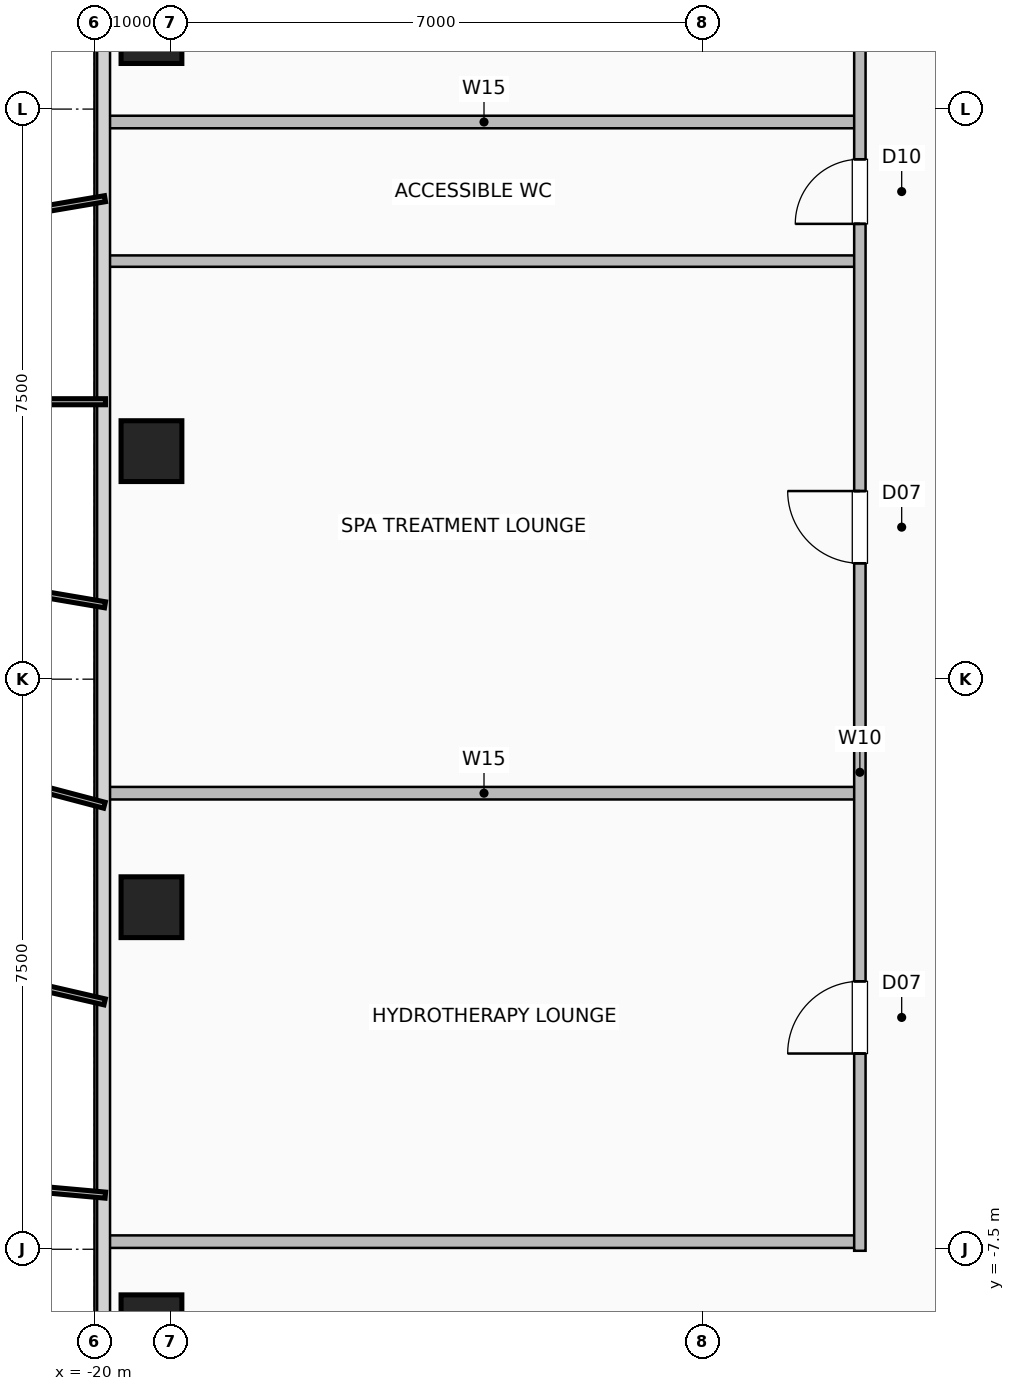
"""IFC4 building model, lengths in metres.
Left out: names, types, materials, properties, quantities, classifications, styles, units other than length and angle.
Written with IfcOpenShell. Run it as: python <this file> out.ifc"""

import sys

from ifc_helpers import new_model, si_unit, direction, frame, frame_2d, origin, origin_2d, place, context, subcontext, project, spatial, rectangle, hollow_rectangle, extrude, element, fill, save


model = new_model("IFC4")
c1 = context("Model", 3, precision=1e-05, world=origin(), true_north=direction((0.0, 1.0)))
c2 = subcontext(c1, "Body", "Model", "MODEL_VIEW")
j1 = project(units=[si_unit("LENGTHUNIT", "METRE"), si_unit("PLANEANGLEUNIT", "RADIAN")], contexts=[c1])
p1 = place(None, origin())
s1 = spatial("IfcSite", under=j1, at=p1, CompositionType="ELEMENT")
p2 = place(p1, origin())
s2 = spatial("IfcBuilding", under=s1, at=p2, CompositionType="ELEMENT")
p3 = place(p2, frame((0.0, 0.0, 205.8)))
s3 = spatial("IfcBuildingStorey", under=s2, at=p3, CompositionType="ELEMENT", Elevation=205.8)
for number, where, z_axis, x_axis in (
    (1, (-19.25, -8.5, 0.0), (0.0, 0.0, 1.0), (1.0, 0.0, 0.0)),
    (2, (-19.25, -3.0, 0.0), (0.0, 0.0, 1.0), (1.0, 0.0, 0.0)),
    (3, (-19.25, 3.0, 0.0), (0.0, 0.0, 1.0), (1.0, 0.0, 0.0)),
    (4, (-19.25, 8.5, 0.0), (0.0, 0.0, 1.0), (1.0, 0.0, 0.0)),
):
    element("IfcColumn", number, at=place(p3, frame(where, z_axis=z_axis, x_axis=x_axis)), inside=s3, PredefinedType="COLUMN", context=c2, shape_type="SweptSolid", body=[
        extrude(hollow_rectangle(XDim=0.8, YDim=0.8, WallThickness=0.04, at=origin_2d()), origin(), (0.0, 0.0, 1.0), 3.6),
    ])
for number, where, z_axis, x_axis in (
    (5, (-19.82, 7.33, 0.0), (0.0, 0.0, 1.0), (1.0, 0.0, 0.0)),
    (6, (-19.82, -7.4, 0.0), (0.0, 0.0, 1.0), (1.0, 0.0, 0.0)),
    (7, (-19.82, -1.5, 0.0), (0.0, 0.0, 1.0), (1.0, 0.0, 0.0)),
):
    element("IfcWall", number, at=place(p3, frame(where, z_axis=z_axis, x_axis=x_axis)), inside=s3, PredefinedType="PLUMBINGWALL", context=c2, shape_type="SweptSolid", body=[
        extrude(rectangle(XDim=9.89, YDim=0.165, at=frame_2d((4.945, 0.0))), origin(), (0.0, 0.0, 1.0), 3.36),
    ])
p4 = place(p3, frame((-19.82, 5.5, 0.0), z_axis=(0.0, 0.0, 1.0), x_axis=(1.0, 0.0, 0.0)))
e8 = element("IfcWall", 8, at=p4, inside=s3, PredefinedType="PARTITIONING", context=c2, shape_type="SweptSolid", body=[
    extrude(rectangle(XDim=9.89, YDim=0.15, at=frame_2d((4.945, 0.0))), origin(), (0.0, 0.0, 1.0), 3.36),
])
p5 = place(p3, frame((-9.93, -7.52, 0.0), z_axis=(0.0, 0.0, 1.0), x_axis=(0.0, 1.0, 0.0)))
e9 = element("IfcWall", 9, at=p5, inside=s3, PredefinedType="PARTITIONING", context=c2, shape_type="SweptSolid", body=[
    extrude(rectangle(XDim=21.59, YDim=0.15, at=frame_2d((10.795, 0.0))), origin(), (0.0, 0.0, 1.0), 3.36),
])
p6 = place(p5, frame((2.595, 0.0, 0.0)))
e10 = element("IfcOpeningElement", 10, at=p6, cuts=e9, PredefinedType="OPENING", context=c2, shape_type="SweptSolid", body=[
    extrude(rectangle(XDim=0.95, YDim=2.06, at=frame_2d((0.475, 1.03))), frame((0.0, 0.085, 0.0), z_axis=(0.0, -1.0, 0.0), x_axis=(1.0, 0.0, 0.0)), (0.0, 0.0, 1.0), 0.17),
])
p7 = place(p5, frame((9.045, 0.0, 0.0)))
e11 = element("IfcOpeningElement", 11, at=p7, cuts=e9, PredefinedType="OPENING", context=c2, shape_type="SweptSolid", body=[
    extrude(rectangle(XDim=0.95, YDim=2.06, at=frame_2d((0.475, 1.03))), frame((0.0, 0.085, 0.0), z_axis=(0.0, -1.0, 0.0), x_axis=(1.0, 0.0, 0.0)), (0.0, 0.0, 1.0), 0.17),
])
p8 = place(p5, frame((13.51, 0.0, 0.0)))
e12 = element("IfcOpeningElement", 12, at=p8, cuts=e9, PredefinedType="OPENING", context=c2, shape_type="SweptSolid", body=[
    extrude(rectangle(XDim=0.85, YDim=2.05, at=frame_2d((0.425, 1.025))), frame((0.0, 0.085, 0.0), z_axis=(0.0, -1.0, 0.0), x_axis=(1.0, 0.0, 0.0)), (0.0, 0.0, 1.0), 0.17),
])
p9 = place(p5, frame((17.685, 0.0, 0.0)))
e13 = element("IfcOpeningElement", 13, at=p9, cuts=e9, PredefinedType="OPENING", context=c2, shape_type="SweptSolid", body=[
    extrude(rectangle(XDim=0.95, YDim=2.06, at=frame_2d((0.475, 1.03))), frame((0.0, 0.085, 0.0), z_axis=(0.0, -1.0, 0.0), x_axis=(1.0, 0.0, 0.0)), (0.0, 0.0, 1.0), 0.17),
])
p10 = place(p6, origin())
e14 = element("IfcDoor", 14, at=p10, inside=s3, OperationType="SINGLE_SWING_LEFT", PredefinedType="DOOR", context=c2, shape_type="SweptSolid", body=[
    extrude(rectangle(XDim=0.95, YDim=2.06, at=frame_2d((0.475, 1.03))), frame((0.0, 0.025, 0.0), z_axis=(0.0, -1.0, 0.0), x_axis=(1.0, 0.0, 0.0)), (0.0, 0.0, 1.0), 0.05),
])
fill(e10, e14)
p11 = place(p7, origin())
e15 = element("IfcDoor", 15, at=p11, inside=s3, OperationType="SINGLE_SWING_RIGHT", PredefinedType="DOOR", context=c2, shape_type="SweptSolid", body=[
    extrude(rectangle(XDim=0.95, YDim=2.06, at=frame_2d((0.475, 1.03))), frame((0.0, 0.025, 0.0), z_axis=(0.0, -1.0, 0.0), x_axis=(1.0, 0.0, 0.0)), (0.0, 0.0, 1.0), 0.05),
])
fill(e11, e15)
p12 = place(p8, origin())
e16 = element("IfcDoor", 16, at=p12, inside=s3, OperationType="SINGLE_SWING_LEFT", PredefinedType="DOOR", context=c2, shape_type="SweptSolid", body=[
    extrude(rectangle(XDim=0.85, YDim=2.05, at=frame_2d((0.425, 1.025))), frame((0.0, 0.025, 0.0), z_axis=(0.0, -1.0, 0.0), x_axis=(1.0, 0.0, 0.0)), (0.0, 0.0, 1.0), 0.05),
])
fill(e12, e16)
save(model, sys.argv[1])
